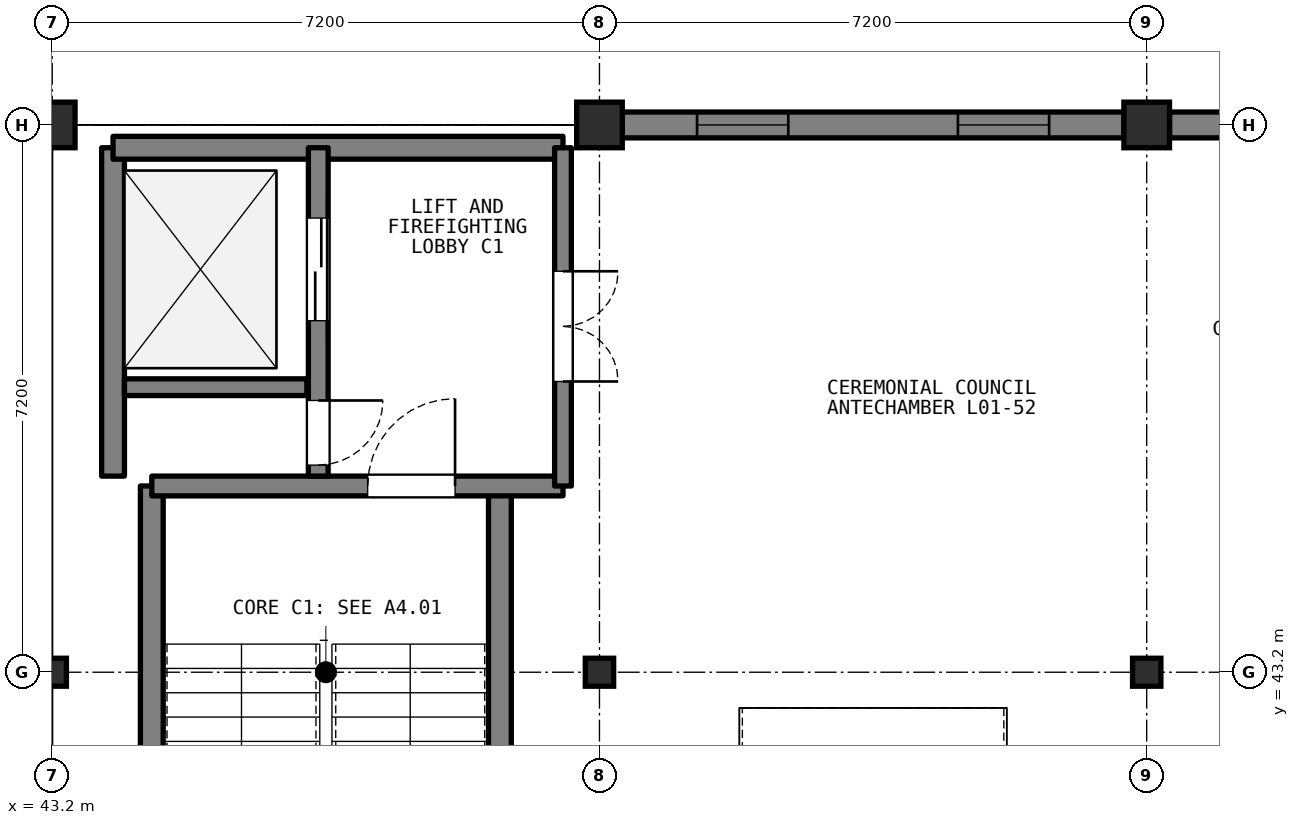
"""IFC4 building model, lengths in metres.
Left out: names, types, materials, properties, quantities, classifications, styles, units other than length and angle.
Written with IfcOpenShell. Run it as: python <this file> out.ifc"""

import sys

from ifc_helpers import new_model, si_unit, direction, frame, frame_2d, origin, origin_2d, place, context, subcontext, project, spatial, rectangle, i_section, extrude, element, fill, save


model = new_model("IFC4")
c1 = context("Model", 3, precision=1e-05, world=origin(), true_north=direction((0.0, 1.0)))
c2 = subcontext(c1, "Body", "Model", "MODEL_VIEW")
j1 = project(units=[si_unit("LENGTHUNIT", "METRE"), si_unit("PLANEANGLEUNIT", "RADIAN")], contexts=[c1])
p1 = place(None, origin())
s1 = spatial("IfcSite", under=j1, at=p1, CompositionType="ELEMENT")
p2 = place(p1, origin())
s2 = spatial("IfcBuilding", under=s1, at=p2, CompositionType="ELEMENT")
p3 = place(p2, origin())
s3 = spatial("IfcBuildingStorey", under=s2, at=p3, CompositionType="ELEMENT", Elevation=0.0)
p4 = place(p3, frame((43.2, 43.2, 0.0), z_axis=(0.0, 0.0, 1.0), x_axis=(1.0, 0.0, 0.0)))
e1 = element("IfcColumn", 1, at=p4, inside=s3, PredefinedType="COLUMN", context=c2, shape_type="SweptSolid", body=[
    extrude(i_section(OverallWidth=0.373, OverallDepth=0.368, WebThickness=0.015, FlangeThickness=0.024, FilletRadius=0.015, at=origin_2d()), origin(), (0.0, 0.0, 1.0), 5.4),
])
p5 = place(p3, frame((43.2, 50.4, 0.0), z_axis=(0.0, 0.0, 1.0), x_axis=(1.0, 0.0, 0.0)))
e2 = element("IfcColumn", 2, at=p5, inside=s3, PredefinedType="COLUMN", context=c2, shape_type="SweptSolid", body=[
    extrude(rectangle(XDim=0.6, YDim=0.6, at=origin_2d()), origin(), (0.0, 0.0, 1.0), 5.4),
])
p6 = place(p3, frame((50.4, 43.2, 0.0), z_axis=(0.0, 0.0, 1.0), x_axis=(1.0, 0.0, 0.0)))
e3 = element("IfcColumn", 3, at=p6, inside=s3, PredefinedType="COLUMN", context=c2, shape_type="SweptSolid", body=[
    extrude(i_section(OverallWidth=0.373, OverallDepth=0.368, WebThickness=0.015, FlangeThickness=0.024, FilletRadius=0.015, at=origin_2d()), origin(), (0.0, 0.0, 1.0), 5.4),
])
p7 = place(p3, frame((50.4, 50.4, 0.0), z_axis=(0.0, 0.0, 1.0), x_axis=(1.0, 0.0, 0.0)))
e4 = element("IfcColumn", 4, at=p7, inside=s3, PredefinedType="COLUMN", context=c2, shape_type="SweptSolid", body=[
    extrude(rectangle(XDim=0.6, YDim=0.6, at=origin_2d()), origin(), (0.0, 0.0, 1.0), 5.4),
])
p8 = place(p3, frame((57.6, 43.2, 0.0), z_axis=(0.0, 0.0, 1.0), x_axis=(1.0, 0.0, 0.0)))
e5 = element("IfcColumn", 5, at=p8, inside=s3, PredefinedType="COLUMN", context=c2, shape_type="SweptSolid", body=[
    extrude(i_section(OverallWidth=0.373, OverallDepth=0.368, WebThickness=0.015, FlangeThickness=0.024, FilletRadius=0.015, at=origin_2d()), origin(), (0.0, 0.0, 1.0), 5.4),
])
p9 = place(p3, frame((57.6, 50.4, 0.0), z_axis=(0.0, 0.0, 1.0), x_axis=(1.0, 0.0, 0.0)))
e6 = element("IfcColumn", 6, at=p9, inside=s3, PredefinedType="COLUMN", context=c2, shape_type="SweptSolid", body=[
    extrude(rectangle(XDim=0.6, YDim=0.6, at=origin_2d()), origin(), (0.0, 0.0, 1.0), 5.4),
])
p10 = place(p3, frame((50.7, 50.4, 0.0), z_axis=(0.0, 0.0, 1.0), x_axis=(1.0, 0.0, 0.0)))
e7 = element("IfcWall", 7, at=p10, inside=s3, PredefinedType="SOLIDWALL", context=c2, shape_type="SweptSolid", body=[
    extrude(rectangle(XDim=6.6, YDim=0.34, at=frame_2d((3.3, 0.0))), origin(), (0.0, 0.0, 1.0), 4.598),
])
p11 = place(p10, frame((0.984, 0.0, 0.95)))
e8 = element("IfcOpeningElement", 8, at=p11, cuts=e7, PredefinedType="OPENING", context=c2, shape_type="SweptSolid", body=[
    extrude(rectangle(XDim=1.2, YDim=1.7, at=frame_2d((0.6, 0.85))), frame((0.0, 0.18, 0.0), z_axis=(0.0, -1.0, 0.0), x_axis=(1.0, 0.0, 0.0)), (0.0, 0.0, 1.0), 0.36),
])
p12 = place(p10, frame((4.416, 0.0, 0.95)))
e9 = element("IfcOpeningElement", 9, at=p12, cuts=e7, PredefinedType="OPENING", context=c2, shape_type="SweptSolid", body=[
    extrude(rectangle(XDim=1.2, YDim=1.7, at=frame_2d((0.6, 0.85))), frame((0.0, 0.18, 0.0), z_axis=(0.0, -1.0, 0.0), x_axis=(1.0, 0.0, 0.0)), (0.0, 0.0, 1.0), 0.36),
])
p13 = place(p3, frame((57.9, 50.4, 0.0), z_axis=(0.0, 0.0, 1.0), x_axis=(1.0, 0.0, 0.0)))
e10 = element("IfcWall", 10, at=p13, inside=s3, PredefinedType="SOLIDWALL", context=c2, shape_type="SweptSolid", body=[
    extrude(rectangle(XDim=6.6, YDim=0.34, at=frame_2d((3.3, 0.0))), origin(), (0.0, 0.0, 1.0), 4.598),
])
p14 = place(p13, frame((0.984, 0.0, 0.95)))
e11 = element("IfcOpeningElement", 11, at=p14, cuts=e10, PredefinedType="OPENING", context=c2, shape_type="SweptSolid", body=[
    extrude(rectangle(XDim=1.2, YDim=1.7, at=frame_2d((0.6, 0.85))), frame((0.0, 0.18, 0.0), z_axis=(0.0, -1.0, 0.0), x_axis=(1.0, 0.0, 0.0)), (0.0, 0.0, 1.0), 0.36),
])
p15 = place(p13, frame((4.416, 0.0, 0.95)))
e12 = element("IfcOpeningElement", 12, at=p15, cuts=e10, PredefinedType="OPENING", context=c2, shape_type="SweptSolid", body=[
    extrude(rectangle(XDim=1.2, YDim=1.7, at=frame_2d((0.6, 0.85))), frame((0.0, 0.18, 0.0), z_axis=(0.0, -1.0, 0.0), x_axis=(1.0, 0.0, 0.0)), (0.0, 0.0, 1.0), 0.36),
])
for number, where, z_axis, x_axis in (
    (13, (44.51, 36.35, 0.0), (0.0, 0.0, 1.0), (0.0, 1.0, 0.0)),
    (14, (49.09, 36.35, 0.0), (0.0, 0.0, 1.0), (0.0, 1.0, 0.0)),
):
    element("IfcWall", number, at=place(p3, frame(where, z_axis=z_axis, x_axis=x_axis)), inside=s3, PredefinedType="SHEAR", context=c2, shape_type="SweptSolid", body=[
        extrude(rectangle(XDim=9.3, YDim=0.3, at=frame_2d((4.65, 0.0))), origin(), (0.0, 0.0, 1.0), 5.2),
    ])
p16 = place(p3, frame((44.51, 45.65, 0.0), z_axis=(0.0, 0.0, 1.0), x_axis=(1.0, 0.0, 0.0)))
e15 = element("IfcWall", 15, at=p16, inside=s3, PredefinedType="SHEAR", context=c2, shape_type="SweptSolid", body=[
    extrude(rectangle(XDim=5.41, YDim=0.26, at=frame_2d((2.705, 0.0))), origin(), (0.0, 0.0, 1.0), 5.2),
])
p17 = place(p16, frame((2.84, 0.0, 0.0)))
e16 = element("IfcOpeningElement", 16, at=p17, cuts=e15, PredefinedType="OPENING", context=c2, shape_type="SweptSolid", body=[
    extrude(rectangle(XDim=1.15, YDim=2.15, at=frame_2d((0.575, 1.075))), frame((0.0, 0.14, 0.0), z_axis=(0.0, -1.0, 0.0), x_axis=(1.0, 0.0, 0.0)), (0.0, 0.0, 1.0), 0.28),
])
p18 = place(p3, frame((44.0, 45.78, 0.0), z_axis=(0.0, 0.0, 1.0), x_axis=(0.0, 1.0, 0.0)))
e17 = element("IfcWall", 17, at=p18, inside=s3, PredefinedType="SHEAR", context=c2, shape_type="SweptSolid", body=[
    extrude(rectangle(XDim=4.32, YDim=0.3, at=frame_2d((2.16, 0.0))), origin(), (0.0, 0.0, 1.0), 5.2),
])
p19 = place(p3, frame((44.0, 50.1, 0.0), z_axis=(0.0, 0.0, 1.0), x_axis=(1.0, 0.0, 0.0)))
e18 = element("IfcWall", 18, at=p19, inside=s3, PredefinedType="SHEAR", context=c2, shape_type="SweptSolid", body=[
    extrude(rectangle(XDim=5.92, YDim=0.3, at=frame_2d((2.96, 0.0))), origin(), (0.0, 0.0, 1.0), 5.2),
])
p20 = place(p3, frame((44.15, 46.95, 0.0), z_axis=(0.0, 0.0, 1.0), x_axis=(1.0, 0.0, 0.0)))
e19 = element("IfcWall", 19, at=p20, inside=s3, PredefinedType="SHEAR", context=c2, shape_type="SweptSolid", body=[
    extrude(rectangle(XDim=2.4, YDim=0.22, at=frame_2d((1.2, 0.0))), origin(), (0.0, 0.0, 1.0), 5.2),
])
p21 = place(p3, frame((46.7, 50.1, 0.0), z_axis=(0.0, 0.0, 1.0), x_axis=(0.0, -1.0, 0.0)))
e20 = element("IfcWall", 20, at=p21, inside=s3, PredefinedType="SHEAR", context=c2, shape_type="SweptSolid", body=[
    extrude(rectangle(XDim=4.32, YDim=0.26, at=frame_2d((2.16, 0.0))), origin(), (0.0, 0.0, 1.0), 5.2),
])
p22 = place(p21, frame((0.925, 0.0, 0.0)))
e21 = element("IfcOpeningElement", 21, at=p22, cuts=e20, PredefinedType="OPENING", context=c2, shape_type="SweptSolid", body=[
    extrude(rectangle(XDim=1.35, YDim=2.2, at=frame_2d((0.675, 1.1))), frame((0.0, 0.14, 0.0), z_axis=(0.0, -1.0, 0.0), x_axis=(1.0, 0.0, 0.0)), (0.0, 0.0, 1.0), 0.28),
])
p23 = place(p21, frame((3.325, 0.0, 0.0)))
e22 = element("IfcOpeningElement", 22, at=p23, cuts=e20, PredefinedType="OPENING", context=c2, shape_type="SweptSolid", body=[
    extrude(rectangle(XDim=0.85, YDim=2.05, at=frame_2d((0.425, 1.025))), frame((0.0, 0.14, 0.0), z_axis=(0.0, -1.0, 0.0), x_axis=(1.0, 0.0, 0.0)), (0.0, 0.0, 1.0), 0.28),
])
p24 = place(p3, frame((49.92, 50.1, 0.0), z_axis=(0.0, 0.0, 1.0), x_axis=(0.0, -1.0, 0.0)))
e23 = element("IfcWall", 23, at=p24, inside=s3, PredefinedType="SHEAR", context=c2, shape_type="SweptSolid", body=[
    extrude(rectangle(XDim=4.45, YDim=0.22, at=frame_2d((2.225, 0.0))), origin(), (0.0, 0.0, 1.0), 5.2),
])
p25 = place(p24, frame((1.625, 0.0, 0.0)))
e24 = element("IfcOpeningElement", 24, at=p25, cuts=e23, PredefinedType="OPENING", context=c2, shape_type="SweptSolid", body=[
    extrude(rectangle(XDim=1.45, YDim=2.2, at=frame_2d((0.725, 1.1))), frame((0.0, 0.12, 0.0), z_axis=(0.0, -1.0, 0.0), x_axis=(1.0, 0.0, 0.0)), (0.0, 0.0, 1.0), 0.24),
])
p26 = place(p11, origin())
e25 = element("IfcWindow", 25, at=p26, inside=s3, PartitioningType="SINGLE_PANEL", PredefinedType="WINDOW", context=c2, shape_type="SweptSolid", body=[
    extrude(rectangle(XDim=1.2, YDim=1.7, at=frame_2d((0.6, 0.85))), frame((0.0, 0.03, 0.0), z_axis=(0.0, -1.0, 0.0), x_axis=(1.0, 0.0, 0.0)), (0.0, 0.0, 1.0), 0.06),
])
fill(e8, e25)
p27 = place(p12, origin())
e26 = element("IfcWindow", 26, at=p27, inside=s3, PartitioningType="SINGLE_PANEL", PredefinedType="WINDOW", context=c2, shape_type="SweptSolid", body=[
    extrude(rectangle(XDim=1.2, YDim=1.7, at=frame_2d((0.6, 0.85))), frame((0.0, 0.03, 0.0), z_axis=(0.0, -1.0, 0.0), x_axis=(1.0, 0.0, 0.0)), (0.0, 0.0, 1.0), 0.06),
])
fill(e9, e26)
p28 = place(p17, origin())
e27 = element("IfcDoor", 27, at=p28, inside=s3, OperationType="SINGLE_SWING_RIGHT", PredefinedType="DOOR", context=c2, shape_type="SweptSolid", body=[
    extrude(rectangle(XDim=1.15, YDim=2.15, at=frame_2d((0.575, 1.075))), frame((0.0, 0.025, 0.0), z_axis=(0.0, -1.0, 0.0), x_axis=(1.0, 0.0, 0.0)), (0.0, 0.0, 1.0), 0.05),
])
fill(e16, e27)
p29 = place(p22, origin())
e28 = element("IfcDoor", 28, at=p29, inside=s3, OperationType="DOUBLE_DOOR_SLIDING", PredefinedType="DOOR", context=c2, shape_type="SweptSolid", body=[
    extrude(rectangle(XDim=1.35, YDim=2.2, at=frame_2d((0.675, 1.1))), frame((0.0, 0.025, 0.0), z_axis=(0.0, -1.0, 0.0), x_axis=(1.0, 0.0, 0.0)), (0.0, 0.0, 1.0), 0.05),
])
fill(e21, e28)
p30 = place(p23, origin())
e29 = element("IfcDoor", 29, at=p30, inside=s3, OperationType="SINGLE_SWING_LEFT", PredefinedType="DOOR", context=c2, shape_type="SweptSolid", body=[
    extrude(rectangle(XDim=0.85, YDim=2.05, at=frame_2d((0.425, 1.025))), frame((0.0, 0.025, 0.0), z_axis=(0.0, -1.0, 0.0), x_axis=(1.0, 0.0, 0.0)), (0.0, 0.0, 1.0), 0.05),
])
fill(e22, e29)
p31 = place(p25, origin())
e30 = element("IfcDoor", 30, at=p31, inside=s3, OperationType="DOUBLE_DOOR_SINGLE_SWING", PredefinedType="DOOR", context=c2, shape_type="SweptSolid", body=[
    extrude(rectangle(XDim=1.45, YDim=2.2, at=frame_2d((0.725, 1.1))), frame((0.0, 0.025, 0.0), z_axis=(0.0, -1.0, 0.0), x_axis=(1.0, 0.0, 0.0)), (0.0, 0.0, 1.0), 0.05),
])
fill(e24, e30)
save(model, sys.argv[1])
